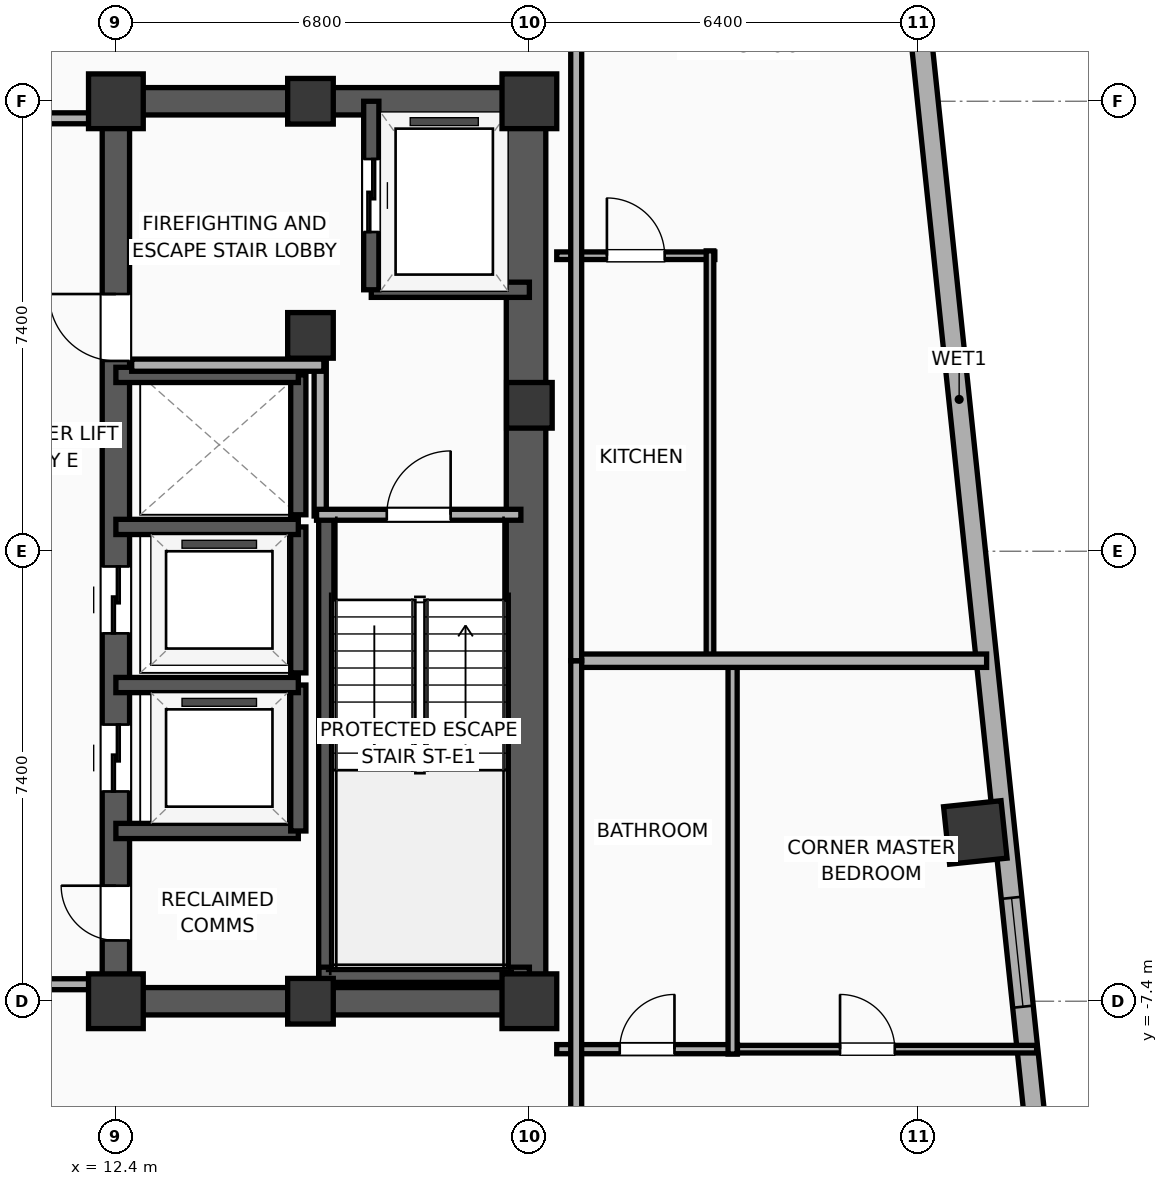
"""IFC4 building model, lengths in metres.
Left out: names, types, materials, properties, quantities, classifications, styles, units other than length and angle.
Written with IfcOpenShell. Run it as: python <this file> out.ifc"""

import sys

from ifc_helpers import new_model, si_unit, direction, frame, frame_2d, origin, origin_2d, place, context, subcontext, project, spatial, rectangle, hollow_rectangle, extrude, element, fill, save


model = new_model("IFC4")
c1 = context("Model", 3, precision=1e-05, world=origin(), true_north=direction((0.0, 1.0)))
c2 = subcontext(c1, "Body", "Model", "MODEL_VIEW")
j1 = project(units=[si_unit("LENGTHUNIT", "METRE"), si_unit("PLANEANGLEUNIT", "RADIAN")], contexts=[c1])
p1 = place(None, origin())
s1 = spatial("IfcSite", under=j1, at=p1, CompositionType="ELEMENT")
p2 = place(p1, origin())
s2 = spatial("IfcBuilding", under=s1, at=p2, CompositionType="ELEMENT")
p3 = place(p2, frame((0.0, 0.0, 175.5)))
s3 = spatial("IfcBuildingStorey", under=s2, at=p3, CompositionType="ELEMENT", Elevation=175.5)
p4 = place(p3, frame((12.4, -7.4, 0.0), z_axis=(0.0, 0.0, 1.0), x_axis=(1.0, 0.0, 0.0)))
e1 = element("IfcColumn", 1, at=p4, inside=s3, PredefinedType="COLUMN", context=c2, shape_type="SweptSolid", body=[
    extrude(rectangle(XDim=0.9, YDim=0.9, at=origin_2d()), origin(), (0.0, 0.0, 1.0), 3.9),
])
p5 = place(p3, frame((15.6, 3.55, 0.0), z_axis=(0.0, 0.0, 1.0), x_axis=(1.0, 0.0, 0.0)))
e2 = element("IfcColumn", 2, at=p5, inside=s3, PredefinedType="COLUMN", context=c2, shape_type="SweptSolid", body=[
    extrude(rectangle(XDim=0.75, YDim=0.75, at=origin_2d()), origin(), (0.0, 0.0, 1.0), 3.9),
])
p6 = place(p3, frame((12.4, 7.4, 0.0), z_axis=(0.0, 0.0, 1.0), x_axis=(1.0, 0.0, 0.0)))
e3 = element("IfcColumn", 3, at=p6, inside=s3, PredefinedType="COLUMN", context=c2, shape_type="SweptSolid", body=[
    extrude(rectangle(XDim=0.9, YDim=0.9, at=origin_2d()), origin(), (0.0, 0.0, 1.0), 3.9),
])
for number, where, z_axis, x_axis in (
    (4, (15.6, -7.4, 0.0), (0.0, 0.0, 1.0), (1.0, 0.0, 0.0)),
    (5, (15.6, 7.4, 0.0), (0.0, 0.0, 1.0), (1.0, 0.0, 0.0)),
):
    element("IfcColumn", number, at=place(p3, frame(where, z_axis=z_axis, x_axis=x_axis)), inside=s3, PredefinedType="COLUMN", context=c2, shape_type="SweptSolid", body=[
        extrude(rectangle(XDim=0.75, YDim=0.75, at=origin_2d()), origin(), (0.0, 0.0, 1.0), 3.9),
    ])
p7 = place(p3, frame((19.2, -7.4, 0.0), z_axis=(0.0, 0.0, 1.0), x_axis=(1.0, 0.0, 0.0)))
e6 = element("IfcColumn", 6, at=p7, inside=s3, PredefinedType="COLUMN", context=c2, shape_type="SweptSolid", body=[
    extrude(rectangle(XDim=0.9, YDim=0.9, at=origin_2d()), origin(), (0.0, 0.0, 1.0), 3.9),
])
p8 = place(p3, frame((19.2, 2.4, 0.0), z_axis=(0.0, 0.0, 1.0), x_axis=(1.0, 0.0, 0.0)))
e7 = element("IfcColumn", 7, at=p8, inside=s3, PredefinedType="COLUMN", context=c2, shape_type="SweptSolid", body=[
    extrude(rectangle(XDim=0.75, YDim=0.75, at=origin_2d()), origin(), (0.0, 0.0, 1.0), 3.9),
])
p9 = place(p3, frame((19.2, 7.4, 0.0), z_axis=(0.0, 0.0, 1.0), x_axis=(1.0, 0.0, 0.0)))
e8 = element("IfcColumn", 8, at=p9, inside=s3, PredefinedType="COLUMN", context=c2, shape_type="SweptSolid", body=[
    extrude(rectangle(XDim=0.9, YDim=0.9, at=origin_2d()), origin(), (0.0, 0.0, 1.0), 3.9),
])
for number, where, z_axis, x_axis in (
    (9, (12.175, -7.4, 0.0), (0.0, 0.0, 1.0), (1.0, 0.0, 0.0)),
    (10, (12.175, 7.4, 0.0), (0.0, 0.0, 1.0), (1.0, 0.0, 0.0)),
):
    element("IfcWall", number, at=place(p3, frame(where, z_axis=z_axis, x_axis=x_axis)), inside=s3, PredefinedType="SHEAR", context=c2, shape_type="SweptSolid", body=[
        extrude(rectangle(XDim=7.25, YDim=0.45, at=frame_2d((3.625, 0.0))), origin(), (0.0, 0.0, 1.0), 3.65),
    ])
p10 = place(p3, frame((12.4, -7.4, 0.0), z_axis=(0.0, 0.0, 1.0), x_axis=(0.0, 1.0, 0.0)))
e11 = element("IfcWall", 11, at=p10, inside=s3, PredefinedType="SHEAR", context=c2, shape_type="SweptSolid", body=[
    extrude(rectangle(XDim=14.8, YDim=0.45, at=frame_2d((7.4, 0.0))), origin(), (0.0, 0.0, 1.0), 3.65),
])
p11 = place(p10, frame((3.45, 0.0, 0.0)))
e12 = element("IfcOpeningElement", 12, at=p11, cuts=e11, PredefinedType="OPENING", context=c2, shape_type="SweptSolid", body=[
    extrude(rectangle(XDim=1.1, YDim=2.05, at=frame_2d((0.55, 1.025))), frame((0.0, 0.235, 0.0), z_axis=(0.0, -1.0, 0.0), x_axis=(1.0, 0.0, 0.0)), (0.0, 0.0, 1.0), 0.47),
])
p12 = place(p10, frame((6.05, 0.0, 0.0)))
e13 = element("IfcOpeningElement", 13, at=p12, cuts=e11, PredefinedType="OPENING", context=c2, shape_type="SweptSolid", body=[
    extrude(rectangle(XDim=1.1, YDim=2.05, at=frame_2d((0.55, 1.025))), frame((0.0, 0.235, 0.0), z_axis=(0.0, -1.0, 0.0), x_axis=(1.0, 0.0, 0.0)), (0.0, 0.0, 1.0), 0.47),
])
p13 = place(p10, frame((10.53, 0.0, 0.0)))
e14 = element("IfcOpeningElement", 14, at=p13, cuts=e11, PredefinedType="OPENING", context=c2, shape_type="SweptSolid", body=[
    extrude(rectangle(XDim=1.1, YDim=2.05, at=frame_2d((0.55, 1.025))), frame((0.0, 0.235, 0.0), z_axis=(0.0, -1.0, 0.0), x_axis=(1.0, 0.0, 0.0)), (0.0, 0.0, 1.0), 0.47),
])
p14 = place(p10, frame((1.0, 0.0, 0.0)))
e15 = element("IfcOpeningElement", 15, at=p14, cuts=e11, PredefinedType="OPENING", context=c2, shape_type="SweptSolid", body=[
    extrude(rectangle(XDim=0.9, YDim=2.05, at=frame_2d((0.45, 1.025))), frame((0.0, 0.235, 0.0), z_axis=(0.0, -1.0, 0.0), x_axis=(1.0, 0.0, 0.0)), (0.0, 0.0, 1.0), 0.47),
])
p15 = place(p3, frame((19.145, -7.4, 0.0), z_axis=(0.0, 0.0, 1.0), x_axis=(0.0, 1.0, 0.0)))
e16 = element("IfcWall", 16, at=p15, inside=s3, PredefinedType="SHEAR", context=c2, shape_type="SweptSolid", body=[
    extrude(rectangle(XDim=14.8, YDim=0.65, at=frame_2d((7.4, 0.0))), origin(), (0.0, 0.0, 1.0), 3.65),
])
p16 = place(p3, frame((15.86, -7.085, 0.0), z_axis=(0.0, 0.0, 1.0), x_axis=(0.0, 1.0, 0.0)))
e17 = element("IfcWall", 17, at=p16, inside=s3, PredefinedType="SOLIDWALL", context=c2, shape_type="SweptSolid", body=[
    extrude(rectangle(XDim=7.685, YDim=0.25, at=frame_2d((3.843, 0.0))), origin(), (0.0, 0.0, 1.0), 3.65),
])
p17 = place(p3, frame((15.74, -6.965, 0.0), z_axis=(0.0, 0.0, 1.0), x_axis=(1.0, 0.0, 0.0)))
e18 = element("IfcWall", 18, at=p17, inside=s3, PredefinedType="SOLIDWALL", context=c2, shape_type="SweptSolid", body=[
    extrude(rectangle(XDim=3.46, YDim=0.25, at=frame_2d((1.73, 0.0))), origin(), (0.0, 0.0, 1.0), 3.65),
])
p18 = place(p3, frame((26.533, -4.624, 0.0), z_axis=(0.0, 0.0, 1.0), x_axis=(0.994521895368, 0.104528463268, 0.0)))
e19 = element("IfcColumn", 19, at=p18, inside=s3, PredefinedType="COLUMN", context=c2, shape_type="SweptSolid", body=[
    extrude(hollow_rectangle(XDim=0.95, YDim=0.95, WallThickness=0.032, at=origin_2d()), origin(), (0.0, 0.0, 1.0), 3.9),
])
p19 = place(p3, frame((24.534, 18.99, 0.0), z_axis=(0.0, 0.0, 1.0), x_axis=(0.104534959766, -0.994521212537, 0.0)))
e20 = element("IfcWall", 20, at=p19, inside=s3, PredefinedType="ELEMENTEDWALL", context=c2, shape_type="SweptSolid", body=[
    extrude(rectangle(XDim=33.166, YDim=0.34, at=frame_2d((16.583, 0.0))), origin(), (0.0, 0.0, 1.0), 3.65),
])
p20 = place(p19, frame((6.542, 0.0, 0.75)))
e21 = element("IfcOpeningElement", 21, at=p20, cuts=e20, PredefinedType="OPENING", context=c2, shape_type="SweptSolid", body=[
    extrude(rectangle(XDim=1.8, YDim=2.1, at=frame_2d((0.9, 1.05))), frame((0.0, 0.18, 0.0), z_axis=(0.0, -1.0, 0.0), x_axis=(1.0, 0.0, 0.0)), (0.0, 0.0, 1.0), 0.36),
])
p21 = place(p19, frame((24.825, 0.0, 0.75)))
e22 = element("IfcOpeningElement", 22, at=p21, cuts=e20, PredefinedType="OPENING", context=c2, shape_type="SweptSolid", body=[
    extrude(rectangle(XDim=1.8, YDim=2.1, at=frame_2d((0.9, 1.05))), frame((0.0, 0.18, 0.0), z_axis=(0.0, -1.0, 0.0), x_axis=(1.0, 0.0, 0.0)), (0.0, 0.0, 1.0), 0.36),
])
p22 = place(p3, frame((16.6, 4.3, 0.0), z_axis=(0.0, 0.0, 1.0), x_axis=(1.0, 0.0, 0.0)))
e23 = element("IfcWall", 23, at=p22, inside=s3, PredefinedType="SOLIDWALL", context=c2, shape_type="SweptSolid", body=[
    extrude(rectangle(XDim=2.6, YDim=0.25, at=frame_2d((1.3, 0.0))), origin(), (0.0, 0.0, 1.0), 3.65),
])
p23 = place(p3, frame((16.6, 7.4, 0.0), z_axis=(0.0, 0.0, 1.0), x_axis=(0.0, -1.0, 0.0)))
e24 = element("IfcWall", 24, at=p23, inside=s3, PredefinedType="SOLIDWALL", context=c2, shape_type="SweptSolid", body=[
    extrude(rectangle(XDim=3.1, YDim=0.25, at=frame_2d((1.55, 0.0))), origin(), (0.0, 0.0, 1.0), 3.65),
])
p24 = place(p23, frame((0.95, 0.0, 0.0)))
e25 = element("IfcOpeningElement", 25, at=p24, cuts=e24, PredefinedType="OPENING", context=c2, shape_type="SweptSolid", body=[
    extrude(rectangle(XDim=1.2, YDim=2.05, at=frame_2d((0.6, 1.025))), frame((0.0, 0.135, 0.0), z_axis=(0.0, -1.0, 0.0), x_axis=(1.0, 0.0, 0.0)), (0.0, 0.0, 1.0), 0.27),
])
p25 = place(p3, frame((12.4, -4.6, 0.0), z_axis=(0.0, 0.0, 1.0), x_axis=(1.0, 0.0, 0.0)))
e26 = element("IfcWall", 26, at=p25, inside=s3, PredefinedType="SOLIDWALL", context=c2, shape_type="SweptSolid", body=[
    extrude(rectangle(XDim=3.0, YDim=0.25, at=frame_2d((1.5, 0.0))), origin(), (0.0, 0.0, 1.0), 3.65),
])
p26 = place(p3, frame((15.4, -4.6, 0.0), z_axis=(0.0, 0.0, 1.0), x_axis=(0.0, 1.0, 0.0)))
e27 = element("IfcWall", 27, at=p26, inside=s3, PredefinedType="SOLIDWALL", context=c2, shape_type="SweptSolid", body=[
    extrude(rectangle(XDim=2.4, YDim=0.25, at=frame_2d((1.2, 0.0))), origin(), (0.0, 0.0, 1.0), 3.65),
])
p27 = place(p3, frame((15.4, -2.2, 0.0), z_axis=(0.0, 0.0, 1.0), x_axis=(-1.0, 0.0, 0.0)))
e28 = element("IfcWall", 28, at=p27, inside=s3, PredefinedType="SOLIDWALL", context=c2, shape_type="SweptSolid", body=[
    extrude(rectangle(XDim=3.0, YDim=0.25, at=frame_2d((1.5, 0.0))), origin(), (0.0, 0.0, 1.0), 3.65),
])
p28 = place(p3, frame((15.4, -2.0, 0.0), z_axis=(0.0, 0.0, 1.0), x_axis=(0.0, 1.0, 0.0)))
e29 = element("IfcWall", 29, at=p28, inside=s3, PredefinedType="SOLIDWALL", context=c2, shape_type="SweptSolid", body=[
    extrude(rectangle(XDim=2.4, YDim=0.25, at=frame_2d((1.2, 0.0))), origin(), (0.0, 0.0, 1.0), 3.65),
])
p29 = place(p3, frame((15.4, 0.4, 0.0), z_axis=(0.0, 0.0, 1.0), x_axis=(-1.0, 0.0, 0.0)))
e30 = element("IfcWall", 30, at=p29, inside=s3, PredefinedType="SOLIDWALL", context=c2, shape_type="SweptSolid", body=[
    extrude(rectangle(XDim=3.0, YDim=0.25, at=frame_2d((1.5, 0.0))), origin(), (0.0, 0.0, 1.0), 3.65),
])
p30 = place(p3, frame((15.4, 0.6, 0.0), z_axis=(0.0, 0.0, 1.0), x_axis=(0.0, 1.0, 0.0)))
e31 = element("IfcWall", 31, at=p30, inside=s3, PredefinedType="SOLIDWALL", context=c2, shape_type="SweptSolid", body=[
    extrude(rectangle(XDim=2.3, YDim=0.25, at=frame_2d((1.15, 0.0))), origin(), (0.0, 0.0, 1.0), 3.65),
])
p31 = place(p3, frame((15.4, 2.9, 0.0), z_axis=(0.0, 0.0, 1.0), x_axis=(-1.0, 0.0, 0.0)))
e32 = element("IfcWall", 32, at=p31, inside=s3, PredefinedType="SOLIDWALL", context=c2, shape_type="SweptSolid", body=[
    extrude(rectangle(XDim=3.0, YDim=0.25, at=frame_2d((1.5, 0.0))), origin(), (0.0, 0.0, 1.0), 3.65),
])
p32 = place(p3, frame((15.76, 0.58, 0.0), z_axis=(0.0, 0.0, 1.0), x_axis=(0.0, 1.0, 0.0)))
e33 = element("IfcWall", 33, at=p32, inside=s3, PredefinedType="PARTITIONING", context=c2, shape_type="SweptSolid", body=[
    extrude(rectangle(XDim=2.52, YDim=0.2, at=frame_2d((1.26, 0.0))), origin(), (0.0, 0.0, 1.0), 3.65),
])
p33 = place(p3, frame((12.66, 3.06, 0.0), z_axis=(0.0, 0.0, 1.0), x_axis=(1.0, 0.0, 0.0)))
e34 = element("IfcWall", 34, at=p33, inside=s3, PredefinedType="PARTITIONING", context=c2, shape_type="SweptSolid", body=[
    extrude(rectangle(XDim=3.16, YDim=0.2, at=frame_2d((1.58, 0.0))), origin(), (0.0, 0.0, 1.0), 3.65),
])
p34 = place(p3, frame((15.7, 0.6, 0.0), z_axis=(0.0, 0.0, 1.0), x_axis=(1.0, 0.0, 0.0)))
e35 = element("IfcWall", 35, at=p34, inside=s3, PredefinedType="PARTITIONING", context=c2, shape_type="SweptSolid", body=[
    extrude(rectangle(XDim=3.36, YDim=0.18, at=frame_2d((1.68, 0.0))), origin(), (0.0, 0.0, 1.0), 3.65),
])
p35 = place(p34, frame((1.155, 0.0, 0.0)))
e36 = element("IfcOpeningElement", 36, at=p35, cuts=e35, PredefinedType="OPENING", context=c2, shape_type="SweptSolid", body=[
    extrude(rectangle(XDim=1.05, YDim=2.05, at=frame_2d((0.525, 1.025))), frame((0.0, 0.1, 0.0), z_axis=(0.0, -1.0, 0.0), x_axis=(1.0, 0.0, 0.0)), (0.0, 0.0, 1.0), 0.2),
])
for number, where, z_axis, x_axis in (
    (37, (9.88, 7.12, 0.0), (0.0, 0.0, 1.0), (1.0, 0.0, 0.0)),
    (38, (9.88, -7.12, 0.0), (0.0, 0.0, 1.0), (1.0, 0.0, 0.0)),
):
    element("IfcWall", number, at=place(p3, frame(where, z_axis=z_axis, x_axis=x_axis)), inside=s3, PredefinedType="PARTITIONING", context=c2, shape_type="SweptSolid", body=[
        extrude(rectangle(XDim=2.27, YDim=0.18, at=frame_2d((1.135, 0.0))), origin(), (0.0, 0.0, 1.0), 3.65),
    ])
p36 = place(p3, frame((22.482, -8.188, 0.0), z_axis=(0.0, 0.0, 1.0), x_axis=(1.0, 0.0, 0.0)))
e39 = element("IfcWall", 39, at=p36, inside=s3, PredefinedType="PARTITIONING", context=c2, shape_type="SweptSolid", body=[
    extrude(rectangle(XDim=5.06, YDim=0.125, at=frame_2d((2.53, 0.0))), origin(), (0.0, 0.0, 1.0), 3.65),
])
p37 = place(p36, frame((1.827, 0.0, 0.0)))
e40 = element("IfcOpeningElement", 40, at=p37, cuts=e39, PredefinedType="OPENING", context=c2, shape_type="SweptSolid", body=[
    extrude(rectangle(XDim=0.9, YDim=2.05, at=frame_2d((0.45, 1.025))), frame((0.0, 0.073, 0.0), z_axis=(0.0, -1.0, 0.0), x_axis=(1.0, 0.0, 0.0)), (0.0, 0.0, 1.0), 0.145),
])
p38 = place(p3, frame((19.65, -8.188, 0.0), z_axis=(0.0, 0.0, 1.0), x_axis=(1.0, 0.0, 0.0)))
e41 = element("IfcWall", 41, at=p38, inside=s3, PredefinedType="PLUMBINGWALL", context=c2, shape_type="SweptSolid", body=[
    extrude(rectangle(XDim=2.972, YDim=0.15, at=frame_2d((1.486, 0.0))), origin(), (0.0, 0.0, 1.0), 3.65),
])
p39 = place(p38, frame((1.036, 0.0, 0.0)))
e42 = element("IfcOpeningElement", 42, at=p39, cuts=e41, PredefinedType="OPENING", context=c2, shape_type="SweptSolid", body=[
    extrude(rectangle(XDim=0.9, YDim=2.05, at=frame_2d((0.45, 1.025))), frame((0.0, 0.085, 0.0), z_axis=(0.0, -1.0, 0.0), x_axis=(1.0, 0.0, 0.0)), (0.0, 0.0, 1.0), 0.17),
])
p40 = place(p3, frame((22.542, -8.268, 0.0), z_axis=(0.0, 0.0, 1.0), x_axis=(0.0, 1.0, 0.0)))
e43 = element("IfcWall", 43, at=p40, inside=s3, PredefinedType="PLUMBINGWALL", context=c2, shape_type="SweptSolid", body=[
    extrude(rectangle(XDim=6.448, YDim=0.15, at=frame_2d((3.224, 0.0))), origin(), (0.0, 0.0, 1.0), 3.65),
])
p41 = place(p3, frame((19.65, 4.86, 0.0), z_axis=(0.0, 0.0, 1.0), x_axis=(1.0, 0.0, 0.0)))
e44 = element("IfcWall", 44, at=p41, inside=s3, PredefinedType="PARTITIONING", context=c2, shape_type="SweptSolid", body=[
    extrude(rectangle(XDim=2.6, YDim=0.125, at=frame_2d((1.3, 0.0))), origin(), (0.0, 0.0, 1.0), 3.65),
])
p42 = place(p41, frame((0.825, 0.0, 0.0)))
e45 = element("IfcOpeningElement", 45, at=p42, cuts=e44, PredefinedType="OPENING", context=c2, shape_type="SweptSolid", body=[
    extrude(rectangle(XDim=0.95, YDim=2.05, at=frame_2d((0.475, 1.025))), frame((0.0, 0.073, 0.0), z_axis=(0.0, -1.0, 0.0), x_axis=(1.0, 0.0, 0.0)), (0.0, 0.0, 1.0), 0.145),
])
p43 = place(p3, frame((22.17, -1.78, 0.0), z_axis=(0.0, 0.0, 1.0), x_axis=(0.0, 1.0, 0.0)))
e46 = element("IfcWall", 46, at=p43, inside=s3, PredefinedType="PARTITIONING", context=c2, shape_type="SweptSolid", body=[
    extrude(rectangle(XDim=6.72, YDim=0.125, at=frame_2d((3.36, 0.0))), origin(), (0.0, 0.0, 1.0), 3.65),
])
p44 = place(p3, frame((19.97, -1.8, 0.0), z_axis=(0.0, 0.0, 1.0), x_axis=(1.0, 0.0, 0.0)))
e47 = element("IfcWall", 47, at=p44, inside=s3, PredefinedType="PARTITIONING", context=c2, shape_type="SweptSolid", body=[
    extrude(rectangle(XDim=6.749, YDim=0.22, at=frame_2d((3.375, 0.0))), origin(), (0.0, 0.0, 1.0), 3.65),
])
p45 = place(p3, frame((19.97, -18.506, 0.0), z_axis=(0.0, 0.0, 1.0), x_axis=(0.0, 1.0, 0.0)))
e48 = element("IfcWall", 48, at=p45, inside=s3, PredefinedType="PARTITIONING", context=c2, shape_type="SweptSolid", body=[
    extrude(rectangle(XDim=16.706, YDim=0.18, at=frame_2d((8.353, 0.0))), origin(), (0.0, 0.0, 1.0), 3.65),
])
p46 = place(p45, frame((8.027, 0.0, 0.0)))
e49 = element("IfcOpeningElement", 49, at=p46, cuts=e48, PredefinedType="OPENING", context=c2, shape_type="SweptSolid", body=[
    extrude(rectangle(XDim=0.9, YDim=2.05, at=frame_2d((0.45, 1.025))), frame((0.0, 0.1, 0.0), z_axis=(0.0, -1.0, 0.0), x_axis=(1.0, 0.0, 0.0)), (0.0, 0.0, 1.0), 0.2),
])
p47 = place(p3, frame((19.97, -1.8, 0.0), z_axis=(0.0, 0.0, 1.0), x_axis=(0.0, 1.0, 0.0)))
e50 = element("IfcWall", 50, at=p47, inside=s3, PredefinedType="PARTITIONING", context=c2, shape_type="SweptSolid", body=[
    extrude(rectangle(XDim=23.977, YDim=0.18, at=frame_2d((11.988, 0.0))), origin(), (0.0, 0.0, 1.0), 3.04),
])
p48 = place(p47, frame((11.38, 0.0, 0.0)))
e51 = element("IfcOpeningElement", 51, at=p48, cuts=e50, PredefinedType="OPENING", context=c2, shape_type="SweptSolid", body=[
    extrude(rectangle(XDim=0.9, YDim=2.05, at=frame_2d((0.45, 1.025))), frame((0.0, 0.1, 0.0), z_axis=(0.0, -1.0, 0.0), x_axis=(1.0, 0.0, 0.0)), (0.0, 0.0, 1.0), 0.2),
])
p49 = place(p21, origin())
e52 = element("IfcWindow", 52, at=p49, inside=s3, PartitioningType="SINGLE_PANEL", PredefinedType="WINDOW", context=c2, shape_type="SweptSolid", body=[
    extrude(rectangle(XDim=1.8, YDim=2.1, at=frame_2d((0.9, 1.05))), frame((0.0, 0.03, 0.0), z_axis=(0.0, -1.0, 0.0), x_axis=(1.0, 0.0, 0.0)), (0.0, 0.0, 1.0), 0.06),
])
fill(e22, e52)
p50 = place(p24, origin())
e53 = element("IfcDoor", 53, at=p50, inside=s3, OperationType="SLIDING_TO_LEFT", PredefinedType="DOOR", context=c2, shape_type="SweptSolid", body=[
    extrude(rectangle(XDim=1.2, YDim=2.05, at=frame_2d((0.6, 1.025))), frame((0.0, 0.025, 0.0), z_axis=(0.0, -1.0, 0.0), x_axis=(1.0, 0.0, 0.0)), (0.0, 0.0, 1.0), 0.05),
])
fill(e25, e53)
p51 = place(p11, origin())
e54 = element("IfcDoor", 54, at=p51, inside=s3, OperationType="SLIDING_TO_LEFT", PredefinedType="DOOR", context=c2, shape_type="SweptSolid", body=[
    extrude(rectangle(XDim=1.1, YDim=2.05, at=frame_2d((0.55, 1.025))), frame((0.0, 0.025, 0.0), z_axis=(0.0, -1.0, 0.0), x_axis=(1.0, 0.0, 0.0)), (0.0, 0.0, 1.0), 0.05),
])
fill(e12, e54)
p52 = place(p12, origin())
e55 = element("IfcDoor", 55, at=p52, inside=s3, OperationType="SLIDING_TO_LEFT", PredefinedType="DOOR", context=c2, shape_type="SweptSolid", body=[
    extrude(rectangle(XDim=1.1, YDim=2.05, at=frame_2d((0.55, 1.025))), frame((0.0, 0.025, 0.0), z_axis=(0.0, -1.0, 0.0), x_axis=(1.0, 0.0, 0.0)), (0.0, 0.0, 1.0), 0.05),
])
fill(e13, e55)
p53 = place(p35, origin())
e56 = element("IfcDoor", 56, at=p53, inside=s3, OperationType="SINGLE_SWING_RIGHT", PredefinedType="DOOR", context=c2, shape_type="SweptSolid", body=[
    extrude(rectangle(XDim=1.05, YDim=2.05, at=frame_2d((0.525, 1.025))), frame((0.0, 0.025, 0.0), z_axis=(0.0, -1.0, 0.0), x_axis=(1.0, 0.0, 0.0)), (0.0, 0.0, 1.0), 0.05),
])
fill(e36, e56)
p54 = place(p37, origin())
e57 = element("IfcDoor", 57, at=p54, inside=s3, OperationType="SINGLE_SWING_LEFT", PredefinedType="DOOR", context=c2, shape_type="SweptSolid", body=[
    extrude(rectangle(XDim=0.9, YDim=2.05, at=frame_2d((0.45, 1.025))), frame((0.0, 0.025, 0.0), z_axis=(0.0, -1.0, 0.0), x_axis=(1.0, 0.0, 0.0)), (0.0, 0.0, 1.0), 0.05),
])
fill(e40, e57)
p55 = place(p39, origin())
e58 = element("IfcDoor", 58, at=p55, inside=s3, OperationType="SINGLE_SWING_RIGHT", PredefinedType="DOOR", context=c2, shape_type="SweptSolid", body=[
    extrude(rectangle(XDim=0.9, YDim=2.05, at=frame_2d((0.45, 1.025))), frame((0.0, 0.025, 0.0), z_axis=(0.0, -1.0, 0.0), x_axis=(1.0, 0.0, 0.0)), (0.0, 0.0, 1.0), 0.05),
])
fill(e42, e58)
p56 = place(p42, origin())
e59 = element("IfcDoor", 59, at=p56, inside=s3, OperationType="SINGLE_SWING_LEFT", PredefinedType="DOOR", context=c2, shape_type="SweptSolid", body=[
    extrude(rectangle(XDim=0.95, YDim=2.05, at=frame_2d((0.475, 1.025))), frame((0.0, 0.025, 0.0), z_axis=(0.0, -1.0, 0.0), x_axis=(1.0, 0.0, 0.0)), (0.0, 0.0, 1.0), 0.05),
])
fill(e45, e59)
p57 = place(p13, origin())
e60 = element("IfcDoor", 60, at=p57, inside=s3, OperationType="SINGLE_SWING_RIGHT", PredefinedType="DOOR", context=c2, shape_type="SweptSolid", body=[
    extrude(rectangle(XDim=1.1, YDim=2.05, at=frame_2d((0.55, 1.025))), frame((0.0, 0.025, 0.0), z_axis=(0.0, -1.0, 0.0), x_axis=(1.0, 0.0, 0.0)), (0.0, 0.0, 1.0), 0.05),
])
fill(e14, e60)
p58 = place(p14, origin())
e61 = element("IfcDoor", 61, at=p58, inside=s3, OperationType="SINGLE_SWING_RIGHT", PredefinedType="DOOR", context=c2, shape_type="SweptSolid", body=[
    extrude(rectangle(XDim=0.9, YDim=2.05, at=frame_2d((0.45, 1.025))), frame((0.0, 0.025, 0.0), z_axis=(0.0, -1.0, 0.0), x_axis=(1.0, 0.0, 0.0)), (0.0, 0.0, 1.0), 0.05),
])
fill(e15, e61)
save(model, sys.argv[1])
